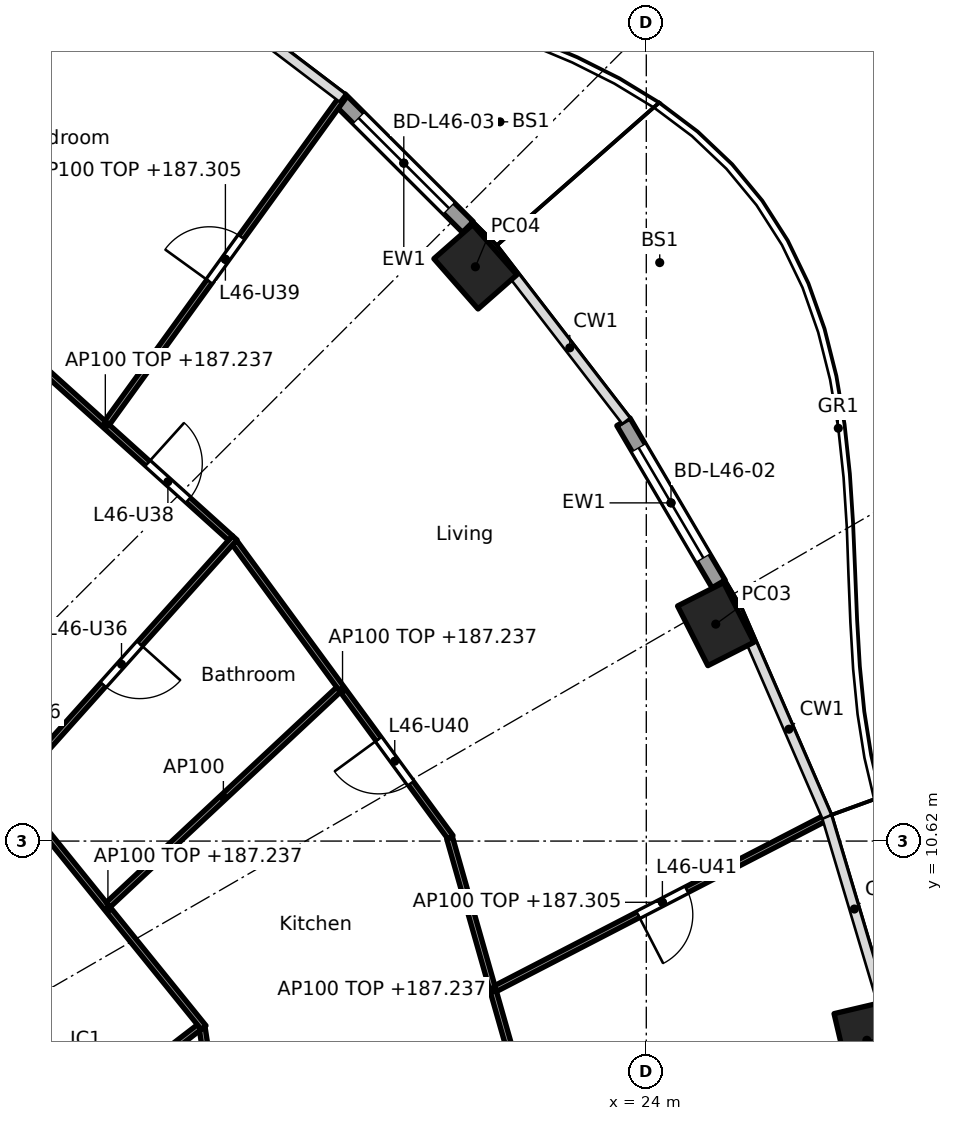
"""IFC4 building model, lengths in metres.
Left out: names, types, materials, properties, quantities, classifications, styles, units other than length and angle.
Written with IfcOpenShell. Run it as: python <this file> out.ifc"""

import sys

from ifc_helpers import new_model, si_unit, direction, frame, frame_2d, origin, origin_2d, place, context, subcontext, project, spatial, rectangle, hollow_rectangle, extrude, element, fill, save


model = new_model("IFC4")
c1 = context("Model", 3, precision=1e-05, world=origin(), true_north=direction((0.0, 1.0)))
c2 = subcontext(c1, "Body", "Model", "MODEL_VIEW")
j1 = project(units=[si_unit("LENGTHUNIT", "METRE"), si_unit("PLANEANGLEUNIT", "RADIAN")], contexts=[c1])
p1 = place(None, origin())
s1 = spatial("IfcSite", under=j1, at=p1, CompositionType="ELEMENT")
p2 = place(p1, origin())
s2 = spatial("IfcBuilding", under=s1, at=p2, CompositionType="ELEMENT")
p3 = place(p2, frame((0.0, 0.0, 184.4)))
s3 = spatial("IfcBuildingStorey", under=s2, at=p3, CompositionType="ELEMENT", Elevation=184.4)
for number, where, z_axis, x_axis in (
    (1, (27.627, 7.344, 0.0), (0.0, 0.0, 1.0), (-0.229, 0.973, 0.0)),
    (2, (25.142, 14.188, 0.0), (0.0, 0.0, 1.0), (-0.452, 0.892, 0.0)),
    (3, (21.189, 20.064, 0.0), (0.0, 0.0, 1.0), (-0.66, 0.751, 0.0)),
):
    element("IfcColumn", number, at=place(p3, frame(where, z_axis=z_axis, x_axis=x_axis)), inside=s3, PredefinedType="COLUMN", context=c2, shape_type="SweptSolid", body=[
        extrude(hollow_rectangle(XDim=1.1, YDim=0.85, WallThickness=0.036, at=origin_2d()), origin(), (0.0, 0.0, 1.0), 3.7),
    ])
p4 = place(p3, frame((23.624, 17.515, 0.0), z_axis=(0.0, 0.0, 1.0), x_axis=(0.506367803691, -0.862317602386, 0.0)))
e4 = element("IfcWall", 4, at=p4, inside=s3, PredefinedType="SOLIDWALL", context=c2, shape_type="SweptSolid", body=[
    extrude(rectangle(XDim=3.092, YDim=0.25, at=frame_2d((1.546, 0.0))), origin(), (0.0, 0.0, 1.0), 3.44),
])
p5 = place(p4, frame((0.496, 0.0, 0.0)))
e5 = element("IfcOpeningElement", 5, at=p5, cuts=e4, PredefinedType="OPENING", context=c2, shape_type="SweptSolid", body=[
    extrude(rectangle(XDim=2.1, YDim=2.4, at=frame_2d((1.05, 1.2))), frame((0.0, 0.135, 0.0), z_axis=(0.0, -1.0, 0.0), x_axis=(1.0, 0.0, 0.0)), (0.0, 0.0, 1.0), 0.27),
])
p6 = place(p3, frame((18.959, 22.82, 0.0), z_axis=(0.0, 0.0, 1.0), x_axis=(0.707844845069, -0.706367946122, 0.0)))
e6 = element("IfcWall", 6, at=p6, inside=s3, PredefinedType="SOLIDWALL", context=c2, shape_type="SweptSolid", body=[
    extrude(rectangle(XDim=2.976, YDim=0.25, at=frame_2d((1.488, 0.0))), origin(), (0.0, 0.0, 1.0), 3.44),
])
p7 = place(p6, frame((0.438, 0.0, 0.0)))
e7 = element("IfcOpeningElement", 7, at=p7, cuts=e6, PredefinedType="OPENING", context=c2, shape_type="SweptSolid", body=[
    extrude(rectangle(XDim=2.1, YDim=2.4, at=frame_2d((1.05, 1.2))), frame((0.0, 0.135, 0.0), z_axis=(0.0, -1.0, 0.0), x_axis=(1.0, 0.0, 0.0)), (0.0, 0.0, 1.0), 0.27),
])
p8 = place(p3, frame((17.221, 4.113, 0.0), z_axis=(0.0, 0.0, 1.0), x_axis=(-0.151078880423, 0.988521710379, 0.0)))
e8 = element("IfcWall", 8, at=p8, inside=s3, PredefinedType="PARTITIONING", context=c2, shape_type="SweptSolid", body=[
    extrude(rectangle(XDim=3.469, YDim=0.1, at=frame_2d((1.735, 0.0))), origin(), (0.0, 0.0, 1.0), 2.837),
])
p9 = place(p8, frame((0.18, 0.0, 0.0)))
e9 = element("IfcOpeningElement", 9, at=p9, cuts=e8, PredefinedType="OPENING", context=c2, shape_type="SweptSolid", body=[
    extrude(rectangle(XDim=0.9, YDim=2.1, at=frame_2d((0.45, 1.05))), frame((0.0, 0.06, 0.0), z_axis=(0.0, -1.0, 0.0), x_axis=(1.0, 0.0, 0.0)), (0.0, 0.0, 1.0), 0.12),
])
p10 = place(p3, frame((22.189, 5.67, 0.0), z_axis=(0.0, 0.0, 1.0), x_axis=(-0.273815967041, 0.961782104322, 0.0)))
e10 = element("IfcWall", 10, at=p10, inside=s3, PredefinedType="PARTITIONING", context=c2, shape_type="SweptSolid", body=[
    extrude(rectangle(XDim=5.202, YDim=0.1, at=frame_2d((2.601, 0.0))), origin(), (0.0, 0.0, 1.0), 2.837),
])
p11 = place(p3, frame((21.522, 8.195, 0.0), z_axis=(0.0, 0.0, 1.0), x_axis=(0.888281046031, 0.459300319249, 0.0)))
e11 = element("IfcWall", 11, at=p11, inside=s3, PredefinedType="PARTITIONING", context=c2, shape_type="SweptSolid", body=[
    extrude(rectangle(XDim=6.176, YDim=0.1, at=frame_2d((3.088, 0.0))), origin(), (0.0, 0.0, 1.0), 2.905),
])
p12 = place(p11, frame((2.638, 0.0, 0.0)))
e12 = element("IfcOpeningElement", 12, at=p12, cuts=e11, PredefinedType="OPENING", context=c2, shape_type="SweptSolid", body=[
    extrude(rectangle(XDim=0.9, YDim=2.1, at=frame_2d((0.45, 1.05))), frame((0.0, 0.06, 0.0), z_axis=(0.0, -1.0, 0.0), x_axis=(1.0, 0.0, 0.0)), (0.0, 0.0, 1.0), 0.12),
])
p13 = place(p3, frame((14.822, 6.154, 0.0), z_axis=(0.0, 0.0, 1.0), x_axis=(0.792226528082, 0.610227111987, 0.0)))
e13 = element("IfcWall", 13, at=p13, inside=s3, PredefinedType="PARTITIONING", context=c2, shape_type="SweptSolid", body=[
    extrude(rectangle(XDim=2.307, YDim=0.1, at=frame_2d((1.154, 0.0))), origin(), (0.0, 0.0, 1.0), 3.44),
])
p14 = place(p3, frame((16.721, 7.553, 0.0), z_axis=(0.0, 0.0, 1.0), x_axis=(-0.628753513808, 0.777604667472, 0.0)))
e14 = element("IfcWall", 14, at=p14, inside=s3, PredefinedType="PARTITIONING", context=c2, shape_type="SweptSolid", body=[
    extrude(rectangle(XDim=5.007, YDim=0.1, at=frame_2d((2.504, 0.0))), origin(), (0.0, 0.0, 1.0), 2.837),
])
p15 = place(p3, frame((20.781, 10.681, 0.0), z_axis=(0.0, 0.0, 1.0), x_axis=(-0.591117075283, 0.806585769345, 0.0)))
e15 = element("IfcWall", 15, at=p15, inside=s3, PredefinedType="PARTITIONING", context=c2, shape_type="SweptSolid", body=[
    extrude(rectangle(XDim=6.01, YDim=0.1, at=frame_2d((3.005, 0.0))), origin(), (0.0, 0.0, 1.0), 2.837),
])
p16 = place(p15, frame((1.103, 0.0, 0.0)))
e16 = element("IfcOpeningElement", 16, at=p16, cuts=e15, PredefinedType="OPENING", context=c2, shape_type="SweptSolid", body=[
    extrude(rectangle(XDim=0.9, YDim=2.1, at=frame_2d((0.45, 1.05))), frame((0.0, 0.06, 0.0), z_axis=(0.0, -1.0, 0.0), x_axis=(1.0, 0.0, 0.0)), (0.0, 0.0, 1.0), 0.12),
])
p17 = place(p3, frame((15.152, 9.573, 0.0), z_axis=(0.0, 0.0, 1.0), x_axis=(0.730723083214, 0.682673989294, 0.0)))
e17 = element("IfcWall", 17, at=p17, inside=s3, PredefinedType="PARTITIONING", context=c2, shape_type="SweptSolid", body=[
    extrude(rectangle(XDim=5.183, YDim=0.1, at=frame_2d((2.591, 0.0))), origin(), (0.0, 0.0, 1.0), 3.44),
])
p18 = place(p3, frame((10.178, 7.732, 0.0), z_axis=(0.0, 0.0, 1.0), x_axis=(0.667280084362, 0.744806880348, 0.0)))
e18 = element("IfcWall", 18, at=p18, inside=s3, PredefinedType="PARTITIONING", context=c2, shape_type="SweptSolid", body=[
    extrude(rectangle(XDim=10.572, YDim=0.1, at=frame_2d((5.286, 0.0))), origin(), (0.0, 0.0, 1.0), 2.756),
])
p19 = place(p18, frame((2.07, 0.0, 0.0)))
e19 = element("IfcOpeningElement", 19, at=p19, cuts=e18, PredefinedType="OPENING", context=c2, shape_type="SweptSolid", body=[
    extrude(rectangle(XDim=0.9, YDim=2.1, at=frame_2d((0.45, 1.05))), frame((0.0, 0.06, 0.0), z_axis=(0.0, -1.0, 0.0), x_axis=(1.0, 0.0, 0.0)), (0.0, 0.0, 1.0), 0.12),
])
p20 = place(p18, frame((7.331, 0.0, 0.0)))
e20 = element("IfcOpeningElement", 20, at=p20, cuts=e18, PredefinedType="OPENING", context=c2, shape_type="SweptSolid", body=[
    extrude(rectangle(XDim=0.9, YDim=2.1, at=frame_2d((0.45, 1.05))), frame((0.0, 0.06, 0.0), z_axis=(0.0, -1.0, 0.0), x_axis=(1.0, 0.0, 0.0)), (0.0, 0.0, 1.0), 0.12),
])
p21 = place(p3, frame((17.162, 15.603, 0.0), z_axis=(0.0, 0.0, 1.0), x_axis=(-0.742790086539, 0.66952437397, 0.0)))
e21 = element("IfcWall", 21, at=p21, inside=s3, PredefinedType="PARTITIONING", context=c2, shape_type="SweptSolid", body=[
    extrude(rectangle(XDim=5.542, YDim=0.1, at=frame_2d((2.771, 0.0))), origin(), (0.0, 0.0, 1.0), 2.837),
])
p22 = place(p21, frame((0.935, 0.0, 0.0)))
e22 = element("IfcOpeningElement", 22, at=p22, cuts=e21, PredefinedType="OPENING", context=c2, shape_type="SweptSolid", body=[
    extrude(rectangle(XDim=0.9, YDim=2.1, at=frame_2d((0.45, 1.05))), frame((0.0, 0.06, 0.0), z_axis=(0.0, -1.0, 0.0), x_axis=(1.0, 0.0, 0.0)), (0.0, 0.0, 1.0), 0.12),
])
p23 = place(p3, frame((15.133, 17.498, 0.0), z_axis=(0.0, 0.0, 1.0), x_axis=(0.586223556927, 0.810149332718, 0.0)))
e23 = element("IfcWall", 23, at=p23, inside=s3, PredefinedType="PARTITIONING", context=c2, shape_type="SweptSolid", body=[
    extrude(rectangle(XDim=6.638, YDim=0.1, at=frame_2d((3.319, 0.0))), origin(), (0.0, 0.0, 1.0), 2.905),
])
p24 = place(p23, frame((2.869, 0.0, 0.0)))
e24 = element("IfcOpeningElement", 24, at=p24, cuts=e23, PredefinedType="OPENING", context=c2, shape_type="SweptSolid", body=[
    extrude(rectangle(XDim=0.9, YDim=2.1, at=frame_2d((0.45, 1.05))), frame((0.0, 0.06, 0.0), z_axis=(0.0, -1.0, 0.0), x_axis=(1.0, 0.0, 0.0)), (0.0, 0.0, 1.0), 0.12),
])
p25 = place(p5, origin())
e25 = element("IfcDoor", 25, at=p25, inside=s3, OperationType="SLIDING_TO_LEFT", PredefinedType="DOOR", context=c2, shape_type="SweptSolid", body=[
    extrude(rectangle(XDim=2.1, YDim=2.4, at=frame_2d((1.05, 1.2))), frame((0.0, 0.025, 0.0), z_axis=(0.0, -1.0, 0.0), x_axis=(1.0, 0.0, 0.0)), (0.0, 0.0, 1.0), 0.05),
])
fill(e5, e25)
p26 = place(p7, origin())
e26 = element("IfcDoor", 26, at=p26, inside=s3, OperationType="SLIDING_TO_LEFT", PredefinedType="DOOR", context=c2, shape_type="SweptSolid", body=[
    extrude(rectangle(XDim=2.1, YDim=2.4, at=frame_2d((1.05, 1.2))), frame((0.0, 0.025, 0.0), z_axis=(0.0, -1.0, 0.0), x_axis=(1.0, 0.0, 0.0)), (0.0, 0.0, 1.0), 0.05),
])
fill(e7, e26)
p27 = place(p20, frame((0.9, 0.0, 0.0), x_axis=(-1.0, 0.0, 0.0)))
e27 = element("IfcDoor", 27, at=p27, inside=s3, OperationType="SINGLE_SWING_LEFT", PredefinedType="DOOR", context=c2, shape_type="SweptSolid", body=[
    extrude(rectangle(XDim=0.9, YDim=2.1, at=frame_2d((0.45, 1.05))), frame((0.0, 0.025, 0.0), z_axis=(0.0, -1.0, 0.0), x_axis=(1.0, 0.0, 0.0)), (0.0, 0.0, 1.0), 0.05),
])
fill(e20, e27)
p28 = place(p22, frame((0.9, 0.0, 0.0), x_axis=(-1.0, 0.0, 0.0)))
e28 = element("IfcDoor", 28, at=p28, inside=s3, OperationType="SINGLE_SWING_LEFT", PredefinedType="DOOR", context=c2, shape_type="SweptSolid", body=[
    extrude(rectangle(XDim=0.9, YDim=2.1, at=frame_2d((0.45, 1.05))), frame((0.0, 0.025, 0.0), z_axis=(0.0, -1.0, 0.0), x_axis=(1.0, 0.0, 0.0)), (0.0, 0.0, 1.0), 0.05),
])
fill(e22, e28)
p29 = place(p24, origin())
e29 = element("IfcDoor", 29, at=p29, inside=s3, OperationType="SINGLE_SWING_LEFT", PredefinedType="DOOR", context=c2, shape_type="SweptSolid", body=[
    extrude(rectangle(XDim=0.9, YDim=2.1, at=frame_2d((0.45, 1.05))), frame((0.0, 0.025, 0.0), z_axis=(0.0, -1.0, 0.0), x_axis=(1.0, 0.0, 0.0)), (0.0, 0.0, 1.0), 0.05),
])
fill(e24, e29)
p30 = place(p16, origin())
e30 = element("IfcDoor", 30, at=p30, inside=s3, OperationType="SINGLE_SWING_RIGHT", PredefinedType="DOOR", context=c2, shape_type="SweptSolid", body=[
    extrude(rectangle(XDim=0.9, YDim=2.1, at=frame_2d((0.45, 1.05))), frame((0.0, 0.025, 0.0), z_axis=(0.0, -1.0, 0.0), x_axis=(1.0, 0.0, 0.0)), (0.0, 0.0, 1.0), 0.05),
])
fill(e16, e30)
p31 = place(p12, frame((0.9, 0.0, 0.0), x_axis=(-1.0, 0.0, 0.0)))
e31 = element("IfcDoor", 31, at=p31, inside=s3, OperationType="SINGLE_SWING_RIGHT", PredefinedType="DOOR", context=c2, shape_type="SweptSolid", body=[
    extrude(rectangle(XDim=0.9, YDim=2.1, at=frame_2d((0.45, 1.05))), frame((0.0, 0.025, 0.0), z_axis=(0.0, -1.0, 0.0), x_axis=(1.0, 0.0, 0.0)), (0.0, 0.0, 1.0), 0.05),
])
fill(e12, e31)
save(model, sys.argv[1])
